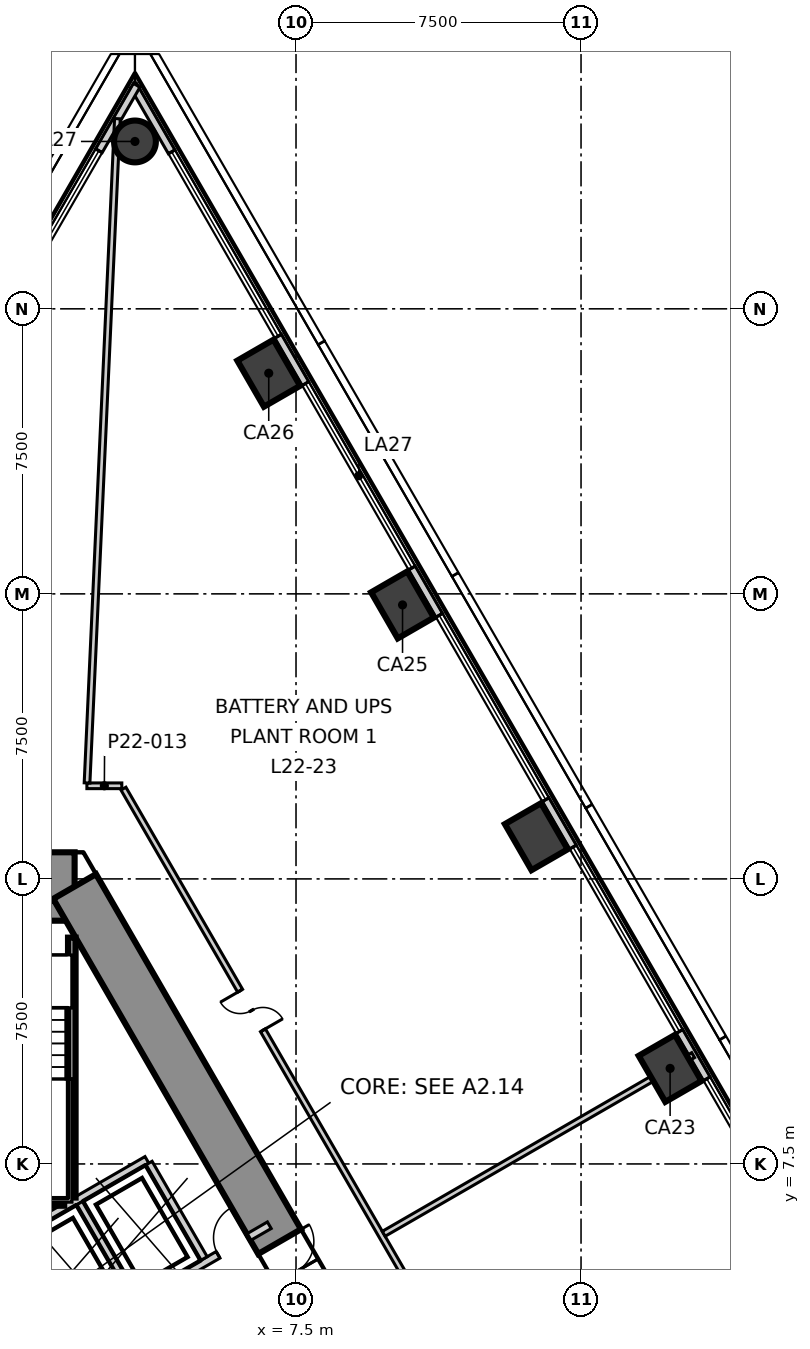
"""IFC4 building model, lengths in metres.
Left out: names, types, materials, properties, quantities, classifications, styles, units other than length and angle.
Written with IfcOpenShell. Run it as: python <this file> out.ifc"""

import sys

from ifc_helpers import new_model, si_unit, direction, frame, frame_2d, origin, origin_2d, place, context, subcontext, project, spatial, polyline, rectangle, circle, outline, extrude, element, fill, save


model = new_model("IFC4")
c1 = context("Model", 3, precision=1e-05, world=origin(), true_north=direction((0.0, 1.0)))
c2 = subcontext(c1, "Body", "Model", "MODEL_VIEW")
j1 = project(units=[si_unit("LENGTHUNIT", "METRE"), si_unit("PLANEANGLEUNIT", "RADIAN")], contexts=[c1])
p1 = place(None, origin())
s1 = spatial("IfcSite", under=j1, at=p1, CompositionType="ELEMENT")
p2 = place(p1, origin())
s2 = spatial("IfcBuilding", under=s1, at=p2, CompositionType="ELEMENT")
p3 = place(p2, frame((0.0, 0.0, 99.8)))
s3 = spatial("IfcBuildingStorey", under=s2, at=p3, CompositionType="ELEMENT", Elevation=99.8)
p4 = place(p3, frame((1.674, 14.8, -0.6), z_axis=(0.0, 0.0, 1.0), x_axis=(-1.0, 0.0, 0.0)))
e1 = element("IfcWall", 1, at=p4, inside=s3, PredefinedType="SHEAR", context=c2, shape_type="SweptSolid", body=[
    extrude(outline(polyline([(-0.231, -0.9), (1.674, -0.9), (3.579, -0.9), (3.117, 0.9), (1.674, 0.9), (0.231, 0.9), (-0.231, -0.9)])), origin(), (0.0, 0.0, 1.0), 4.8),
])
p5 = place(p4, frame((1.133, 0.0, 0.6)))
e2 = element("IfcOpeningElement", 2, at=p5, cuts=e1, PredefinedType="OPENING", context=c2, shape_type="SweptSolid", body=[
    extrude(rectangle(XDim=1.4, YDim=2.1, at=frame_2d((0.7, 1.05))), frame((0.0, 0.91, 0.0), z_axis=(0.0, -1.0, 0.0), x_axis=(1.0, 0.0, 0.0)), (0.0, 0.0, 1.0), 1.82),
])
p6 = place(p3, frame((13.654, -5.95, -0.6), z_axis=(0.0, 0.0, 1.0), x_axis=(-0.499998822509, 0.866026083608, 0.0)))
e3 = element("IfcWall", 3, at=p6, inside=s3, PredefinedType="SHEAR", context=c2, shape_type="SweptSolid", body=[
    extrude(outline(polyline([(-0.664, -0.65), (1.281, -0.65), (3.226, -0.65), (5.172, -0.65), (7.117, -0.65), (9.062, -0.65), (11.007, -0.65), (12.953, -0.65), (14.898, -0.65), (16.843, -0.65), (18.788, -0.65), (20.734, -0.65), (22.679, -0.65), (24.624, -0.65), (23.296, 0.65), (21.41, 0.65), (19.524, 0.65), (17.638, 0.65), (15.752, 0.65), (13.866, 0.65), (11.98, 0.65), (10.094, 0.65), (8.208, 0.65), (6.322, 0.65), (4.436, 0.65), (2.55, 0.65), (0.664, 0.65), (-0.664, -0.65)])), origin(), (0.0, 0.0, 1.0), 4.8),
])
p7 = place(p6, frame((11.369, 0.0, 0.6)))
e4 = element("IfcOpeningElement", 4, at=p7, cuts=e3, PredefinedType="OPENING", context=c2, shape_type="SweptSolid", body=[
    extrude(rectangle(XDim=1.8, YDim=2.1, at=frame_2d((0.9, 1.05))), frame((0.0, 0.66, 0.0), z_axis=(0.0, -1.0, 0.0), x_axis=(1.0, 0.0, 0.0)), (0.0, 0.0, 1.0), 1.32),
])
for number, where, z_axis, x_axis in (
    (5, (17.344, 10.014, -0.6), (0.0, 0.0, 1.0), (-0.5, 0.866, 0.0)),
    (6, (13.823, 16.111, -0.6), (0.0, 0.0, 1.0), (-0.5, 0.866, 0.0)),
    (7, (10.303, 22.209, -0.6), (0.0, 0.0, 1.0), (-0.5, 0.866, 0.0)),
    (8, (6.782, 28.306, -0.6), (0.0, 0.0, 1.0), (-0.5, 0.866, 0.0)),
):
    element("IfcColumn", number, at=place(p3, frame(where, z_axis=z_axis, x_axis=x_axis)), inside=s3, PredefinedType="COLUMN", context=c2, shape_type="SweptSolid", body=[
        extrude(rectangle(XDim=1.4, YDim=1.1, at=origin_2d()), origin(), (0.0, 0.0, 1.0), 4.8),
    ])
p8 = place(p3, frame((3.262, 34.404, -0.6), z_axis=(0.0, 0.0, 1.0), x_axis=(-0.5, 0.866025403784, 0.0)))
e9 = element("IfcColumn", 9, at=p8, inside=s3, PredefinedType="COLUMN", context=c2, shape_type="SweptSolid", body=[
    extrude(circle(Radius=0.55, at=origin_2d()), origin(), (0.0, 0.0, 1.0), 4.8),
])
p9 = place(p3, frame((32.683, -15.155, 0.0), z_axis=(0.0, 0.0, 1.0), x_axis=(-0.499995323711, 0.866028103624, 0.0)))
e10 = element("IfcWall", 10, at=p9, inside=s3, PredefinedType="ELEMENTEDWALL", context=c2, shape_type="SweptSolid", body=[
    extrude(rectangle(XDim=58.913, YDim=0.2, at=frame_2d((29.456, 0.0))), origin(), (0.0, 0.0, 1.0), 4.2),
])
p10 = place(p9, frame((2.023, 0.0, 0.6)))
e11 = element("IfcOpeningElement", 11, at=p10, cuts=e10, PredefinedType="OPENING", context=c2, shape_type="SweptSolid", body=[
    extrude(rectangle(XDim=5.6, YDim=3.0, at=frame_2d((2.8, 1.5))), frame((0.0, 0.11, 0.0), z_axis=(0.0, -1.0, 0.0), x_axis=(1.0, 0.0, 0.0)), (0.0, 0.0, 1.0), 0.22),
])
p11 = place(p9, frame((9.064, 0.0, 0.6)))
e12 = element("IfcOpeningElement", 12, at=p11, cuts=e10, PredefinedType="OPENING", context=c2, shape_type="SweptSolid", body=[
    extrude(rectangle(XDim=5.6, YDim=3.0, at=frame_2d((2.8, 1.5))), frame((0.0, 0.11, 0.0), z_axis=(0.0, -1.0, 0.0), x_axis=(1.0, 0.0, 0.0)), (0.0, 0.0, 1.0), 0.22),
])
p12 = place(p9, frame((16.105, 0.0, 0.6)))
e13 = element("IfcOpeningElement", 13, at=p12, cuts=e10, PredefinedType="OPENING", context=c2, shape_type="SweptSolid", body=[
    extrude(rectangle(XDim=5.6, YDim=3.0, at=frame_2d((2.8, 1.5))), frame((0.0, 0.11, 0.0), z_axis=(0.0, -1.0, 0.0), x_axis=(1.0, 0.0, 0.0)), (0.0, 0.0, 1.0), 0.22),
])
p13 = place(p9, frame((23.146, 0.0, 0.6)))
e14 = element("IfcOpeningElement", 14, at=p13, cuts=e10, PredefinedType="OPENING", context=c2, shape_type="SweptSolid", body=[
    extrude(rectangle(XDim=5.6, YDim=3.0, at=frame_2d((2.8, 1.5))), frame((0.0, 0.11, 0.0), z_axis=(0.0, -1.0, 0.0), x_axis=(1.0, 0.0, 0.0)), (0.0, 0.0, 1.0), 0.22),
])
p14 = place(p9, frame((30.187, 0.0, 0.6)))
e15 = element("IfcOpeningElement", 15, at=p14, cuts=e10, PredefinedType="OPENING", context=c2, shape_type="SweptSolid", body=[
    extrude(rectangle(XDim=5.6, YDim=3.0, at=frame_2d((2.8, 1.5))), frame((0.0, 0.11, 0.0), z_axis=(0.0, -1.0, 0.0), x_axis=(1.0, 0.0, 0.0)), (0.0, 0.0, 1.0), 0.22),
])
p15 = place(p9, frame((37.228, 0.0, 0.6)))
e16 = element("IfcOpeningElement", 16, at=p15, cuts=e10, PredefinedType="OPENING", context=c2, shape_type="SweptSolid", body=[
    extrude(rectangle(XDim=5.6, YDim=3.0, at=frame_2d((2.8, 1.5))), frame((0.0, 0.11, 0.0), z_axis=(0.0, -1.0, 0.0), x_axis=(1.0, 0.0, 0.0)), (0.0, 0.0, 1.0), 0.22),
])
p16 = place(p9, frame((44.268, 0.0, 0.6)))
e17 = element("IfcOpeningElement", 17, at=p16, cuts=e10, PredefinedType="OPENING", context=c2, shape_type="SweptSolid", body=[
    extrude(rectangle(XDim=5.6, YDim=3.0, at=frame_2d((2.8, 1.5))), frame((0.0, 0.11, 0.0), z_axis=(0.0, -1.0, 0.0), x_axis=(1.0, 0.0, 0.0)), (0.0, 0.0, 1.0), 0.22),
])
p17 = place(p9, frame((51.309, 0.0, 0.6)))
e18 = element("IfcOpeningElement", 18, at=p17, cuts=e10, PredefinedType="OPENING", context=c2, shape_type="SweptSolid", body=[
    extrude(rectangle(XDim=5.6, YDim=3.0, at=frame_2d((2.8, 1.5))), frame((0.0, 0.11, 0.0), z_axis=(0.0, -1.0, 0.0), x_axis=(1.0, 0.0, 0.0)), (0.0, 0.0, 1.0), 0.22),
])
p18 = place(p3, frame((3.307, 35.882, 0.0), z_axis=(0.0, 0.0, 1.0), x_axis=(-0.499878413085, -0.866095590643, 0.0)))
e19 = element("IfcWall", 19, at=p18, inside=s3, PredefinedType="ELEMENTEDWALL", context=c2, shape_type="SweptSolid", body=[
    extrude(rectangle(XDim=6.685, YDim=0.2, at=frame_2d((3.343, 0.0))), origin(), (0.0, 0.0, 1.0), 4.2),
])
p19 = place(p18, frame((1.99, 0.0, 0.6)))
e20 = element("IfcOpeningElement", 20, at=p19, cuts=e19, PredefinedType="OPENING", context=c2, shape_type="SweptSolid", body=[
    extrude(rectangle(XDim=3.3, YDim=3.0, at=frame_2d((1.65, 1.5))), frame((0.0, 0.11, 0.0), z_axis=(0.0, -1.0, 0.0), x_axis=(1.0, 0.0, 0.0)), (0.0, 0.0, 1.0), 0.22),
])
p20 = place(p3, frame((1.997, 17.45, 0.0), z_axis=(0.0, 0.0, 1.0), x_axis=(1.0, 0.0, 0.0)))
e21 = element("IfcWall", 21, at=p20, inside=s3, PredefinedType="PARTITIONING", context=c2, shape_type="SweptSolid", body=[
    extrude(rectangle(XDim=0.919, YDim=0.15, at=frame_2d((0.459, 0.0))), origin(), (0.0, 0.0, 1.0), 4.2),
])
p21 = place(p3, frame((2.959, 17.375, 0.0), z_axis=(0.0, 0.0, 1.0), x_axis=(0.500002192499, -0.866024137941, 0.0)))
e22 = element("IfcWall", 22, at=p21, inside=s3, PredefinedType="PARTITIONING", context=c2, shape_type="SweptSolid", body=[
    extrude(rectangle(XDim=27.222, YDim=0.15, at=frame_2d((13.611, 0.0))), origin(), (0.0, 0.0, 1.0), 4.2),
])
p22 = place(p21, frame((19.795, 0.0, 0.0)))
e23 = element("IfcOpeningElement", 23, at=p22, cuts=e22, PredefinedType="OPENING", context=c2, shape_type="SweptSolid", body=[
    extrude(rectangle(XDim=1.2, YDim=2.1, at=frame_2d((0.6, 1.05))), frame((0.0, 0.085, 0.0), z_axis=(0.0, -1.0, 0.0), x_axis=(1.0, 0.0, 0.0)), (0.0, 0.0, 1.0), 0.17),
])
p23 = place(p21, frame((6.141, 0.0, 0.0)))
e24 = element("IfcOpeningElement", 24, at=p23, cuts=e22, PredefinedType="OPENING", context=c2, shape_type="SweptSolid", body=[
    extrude(rectangle(XDim=1.2, YDim=2.1, at=frame_2d((0.6, 1.05))), frame((0.0, 0.085, 0.0), z_axis=(0.0, -1.0, 0.0), x_axis=(1.0, 0.0, 0.0)), (0.0, 0.0, 1.0), 0.17),
])
p24 = place(p3, frame((2.001, 17.525, 0.0), z_axis=(0.0, 0.0, 1.0), x_axis=(0.045670970039, 0.99895653684, 0.0)))
e25 = element("IfcWall", 25, at=p24, inside=s3, PredefinedType="PARTITIONING", context=c2, shape_type="SweptSolid", body=[
    extrude(rectangle(XDim=17.496, YDim=0.15, at=frame_2d((8.748, 0.0))), origin(), (0.0, 0.0, 1.0), 3.4),
])
p25 = place(p3, frame((9.808, 5.662, 0.0), z_axis=(0.0, 0.0, 1.0), x_axis=(0.866014767649, 0.500018421874, 0.0)))
e26 = element("IfcWall", 26, at=p25, inside=s3, PredefinedType="PARTITIONING", context=c2, shape_type="SweptSolid", body=[
    extrude(rectangle(XDim=9.402, YDim=0.15, at=frame_2d((4.701, 0.0))), origin(), (0.0, 0.0, 1.0), 3.7),
])
p26 = place(p3, frame((-0.002, 5.541, 0.0), z_axis=(0.0, 0.0, 1.0), x_axis=(0.86600155993, 0.500041296494, 0.0)))
e27 = element("IfcWall", 27, at=p26, inside=s3, PredefinedType="SOLIDWALL", context=c2, shape_type="SweptSolid", body=[
    extrude(rectangle(XDim=4.132, YDim=0.2, at=frame_2d((2.066, 0.0))), origin(), (0.0, 0.0, 1.0), 4.2),
])
p27 = place(p3, frame((0.0, 5.4, 0.0), z_axis=(0.0, 0.0, 1.0), x_axis=(0.500103862429, -0.865965430478, 0.0)))
e28 = element("IfcWall", 28, at=p27, inside=s3, PredefinedType="SOLIDWALL", context=c2, shape_type="SweptSolid", body=[
    extrude(rectangle(XDim=2.973, YDim=0.2, at=frame_2d((1.487, 0.0))), origin(), (0.0, 0.0, 1.0), 4.2),
])
p28 = place(p27, frame((0.937, 0.0, 0.0)))
e29 = element("IfcOpeningElement", 29, at=p28, cuts=e28, PredefinedType="OPENING", context=c2, shape_type="SweptSolid", body=[
    extrude(rectangle(XDim=1.1, YDim=2.1, at=frame_2d((0.55, 1.05))), frame((0.0, 0.11, 0.0), z_axis=(0.0, -1.0, 0.0), x_axis=(1.0, 0.0, 0.0)), (0.0, 0.0, 1.0), 0.22),
])
p29 = place(p3, frame((1.578, 2.874, 0.0), z_axis=(0.0, 0.0, 1.0), x_axis=(0.866053365281, 0.49995156614, 0.0)))
e30 = element("IfcWall", 30, at=p29, inside=s3, PredefinedType="SOLIDWALL", context=c2, shape_type="SweptSolid", body=[
    extrude(rectangle(XDim=6.026, YDim=0.2, at=frame_2d((3.013, 0.0))), origin(), (0.0, 0.0, 1.0), 4.2),
])
p30 = place(p29, frame((2.496, 0.0, 0.0)))
e31 = element("IfcOpeningElement", 31, at=p30, cuts=e30, PredefinedType="OPENING", context=c2, shape_type="SweptSolid", body=[
    extrude(rectangle(XDim=1.1, YDim=2.1, at=frame_2d((0.55, 1.05))), frame((0.0, 0.11, 0.0), z_axis=(0.0, -1.0, 0.0), x_axis=(1.0, 0.0, 0.0)), (0.0, 0.0, 1.0), 0.22),
])
p31 = place(p29, frame((4.471, 0.0, 0.0)))
e32 = element("IfcOpeningElement", 32, at=p31, cuts=e30, PredefinedType="OPENING", context=c2, shape_type="SweptSolid", body=[
    extrude(rectangle(XDim=0.9, YDim=2.1, at=frame_2d((0.45, 1.05))), frame((0.0, 0.11, 0.0), z_axis=(0.0, -1.0, 0.0), x_axis=(1.0, 0.0, 0.0)), (0.0, 0.0, 1.0), 0.22),
])
for number, where, z_axis, x_axis in (
    (33, (3.626, 7.52, 0.0), (0.0, 0.0, 1.0), (0.5, -0.866, 0.0)),
    (34, (1.807, 6.47, 0.0), (0.0, 0.0, 1.0), (0.5, -0.866, 0.0)),
):
    element("IfcWall", number, at=place(p3, frame(where, z_axis=z_axis, x_axis=x_axis)), inside=s3, PredefinedType="SOLIDWALL", context=c2, shape_type="SweptSolid", body=[
        extrude(rectangle(XDim=2.9, YDim=0.2, at=frame_2d((1.45, 0.0))), origin(), (0.0, 0.0, 1.0), 4.2),
    ])
p32 = place(p3, frame((1.6, 6.615, 0.0), z_axis=(0.0, 0.0, 1.0), x_axis=(0.0, 1.0, 0.0)))
e35 = element("IfcWall", 35, at=p32, inside=s3, PredefinedType="SOLIDWALL", context=c2, shape_type="SweptSolid", body=[
    extrude(rectangle(XDim=6.84, YDim=0.2, at=frame_2d((3.42, 0.0))), origin(), (0.0, 0.0, 1.0), 4.2),
])
p33 = place(p3, frame((-1.4, 6.5, 0.0), z_axis=(0.0, 0.0, 1.0), x_axis=(1.0, 0.0, 0.0)))
e36 = element("IfcWall", 36, at=p33, inside=s3, PredefinedType="SOLIDWALL", context=c2, shape_type="SweptSolid", body=[
    extrude(rectangle(XDim=2.8, YDim=0.2, at=frame_2d((1.4, 0.0))), origin(), (0.0, 0.0, 1.0), 4.2),
])
p34 = place(p13, origin())
e37 = element("IfcWindow", 37, at=p34, inside=s3, PartitioningType="SINGLE_PANEL", PredefinedType="WINDOW", context=c2, shape_type="SweptSolid", body=[
    extrude(rectangle(XDim=5.6, YDim=3.0, at=frame_2d((2.8, 1.5))), frame((0.0, 0.03, 0.0), z_axis=(0.0, -1.0, 0.0), x_axis=(1.0, 0.0, 0.0)), (0.0, 0.0, 1.0), 0.06),
])
fill(e14, e37)
p35 = place(p14, origin())
e38 = element("IfcWindow", 38, at=p35, inside=s3, PartitioningType="SINGLE_PANEL", PredefinedType="WINDOW", context=c2, shape_type="SweptSolid", body=[
    extrude(rectangle(XDim=5.6, YDim=3.0, at=frame_2d((2.8, 1.5))), frame((0.0, 0.03, 0.0), z_axis=(0.0, -1.0, 0.0), x_axis=(1.0, 0.0, 0.0)), (0.0, 0.0, 1.0), 0.06),
])
fill(e15, e38)
p36 = place(p15, origin())
e39 = element("IfcWindow", 39, at=p36, inside=s3, PartitioningType="SINGLE_PANEL", PredefinedType="WINDOW", context=c2, shape_type="SweptSolid", body=[
    extrude(rectangle(XDim=5.6, YDim=3.0, at=frame_2d((2.8, 1.5))), frame((0.0, 0.03, 0.0), z_axis=(0.0, -1.0, 0.0), x_axis=(1.0, 0.0, 0.0)), (0.0, 0.0, 1.0), 0.06),
])
fill(e16, e39)
p37 = place(p16, origin())
e40 = element("IfcWindow", 40, at=p37, inside=s3, PartitioningType="SINGLE_PANEL", PredefinedType="WINDOW", context=c2, shape_type="SweptSolid", body=[
    extrude(rectangle(XDim=5.6, YDim=3.0, at=frame_2d((2.8, 1.5))), frame((0.0, 0.03, 0.0), z_axis=(0.0, -1.0, 0.0), x_axis=(1.0, 0.0, 0.0)), (0.0, 0.0, 1.0), 0.06),
])
fill(e17, e40)
p38 = place(p17, origin())
e41 = element("IfcWindow", 41, at=p38, inside=s3, PartitioningType="SINGLE_PANEL", PredefinedType="WINDOW", context=c2, shape_type="SweptSolid", body=[
    extrude(rectangle(XDim=5.6, YDim=3.0, at=frame_2d((2.8, 1.5))), frame((0.0, 0.03, 0.0), z_axis=(0.0, -1.0, 0.0), x_axis=(1.0, 0.0, 0.0)), (0.0, 0.0, 1.0), 0.06),
])
fill(e18, e41)
p39 = place(p19, origin())
e42 = element("IfcWindow", 42, at=p39, inside=s3, PartitioningType="SINGLE_PANEL", PredefinedType="WINDOW", context=c2, shape_type="SweptSolid", body=[
    extrude(rectangle(XDim=3.3, YDim=3.0, at=frame_2d((1.65, 1.5))), frame((0.0, 0.03, 0.0), z_axis=(0.0, -1.0, 0.0), x_axis=(1.0, 0.0, 0.0)), (0.0, 0.0, 1.0), 0.06),
])
fill(e20, e42)
p40 = place(p23, origin())
e43 = element("IfcDoor", 43, at=p40, inside=s3, OperationType="DOUBLE_DOOR_SINGLE_SWING", PredefinedType="DOOR", context=c2, shape_type="SweptSolid", body=[
    extrude(rectangle(XDim=1.2, YDim=2.1, at=frame_2d((0.6, 1.05))), frame((0.0, 0.025, 0.0), z_axis=(0.0, -1.0, 0.0), x_axis=(1.0, 0.0, 0.0)), (0.0, 0.0, 1.0), 0.05),
])
fill(e24, e43)
p41 = place(p7, origin())
e44 = element("IfcDoor", 44, at=p41, inside=s3, OperationType="DOUBLE_DOOR_SINGLE_SWING", PredefinedType="DOOR", context=c2, shape_type="SweptSolid", body=[
    extrude(rectangle(XDim=1.8, YDim=2.1, at=frame_2d((0.9, 1.05))), frame((0.0, 0.025, 0.0), z_axis=(0.0, -1.0, 0.0), x_axis=(1.0, 0.0, 0.0)), (0.0, 0.0, 1.0), 0.05),
])
fill(e4, e44)
p42 = place(p31, origin())
e45 = element("IfcDoor", 45, at=p42, inside=s3, OperationType="SINGLE_SWING_LEFT", PredefinedType="DOOR", context=c2, shape_type="SweptSolid", body=[
    extrude(rectangle(XDim=0.9, YDim=2.1, at=frame_2d((0.45, 1.05))), frame((0.0, 0.025, 0.0), z_axis=(0.0, -1.0, 0.0), x_axis=(1.0, 0.0, 0.0)), (0.0, 0.0, 1.0), 0.05),
])
fill(e32, e45)
save(model, sys.argv[1])
